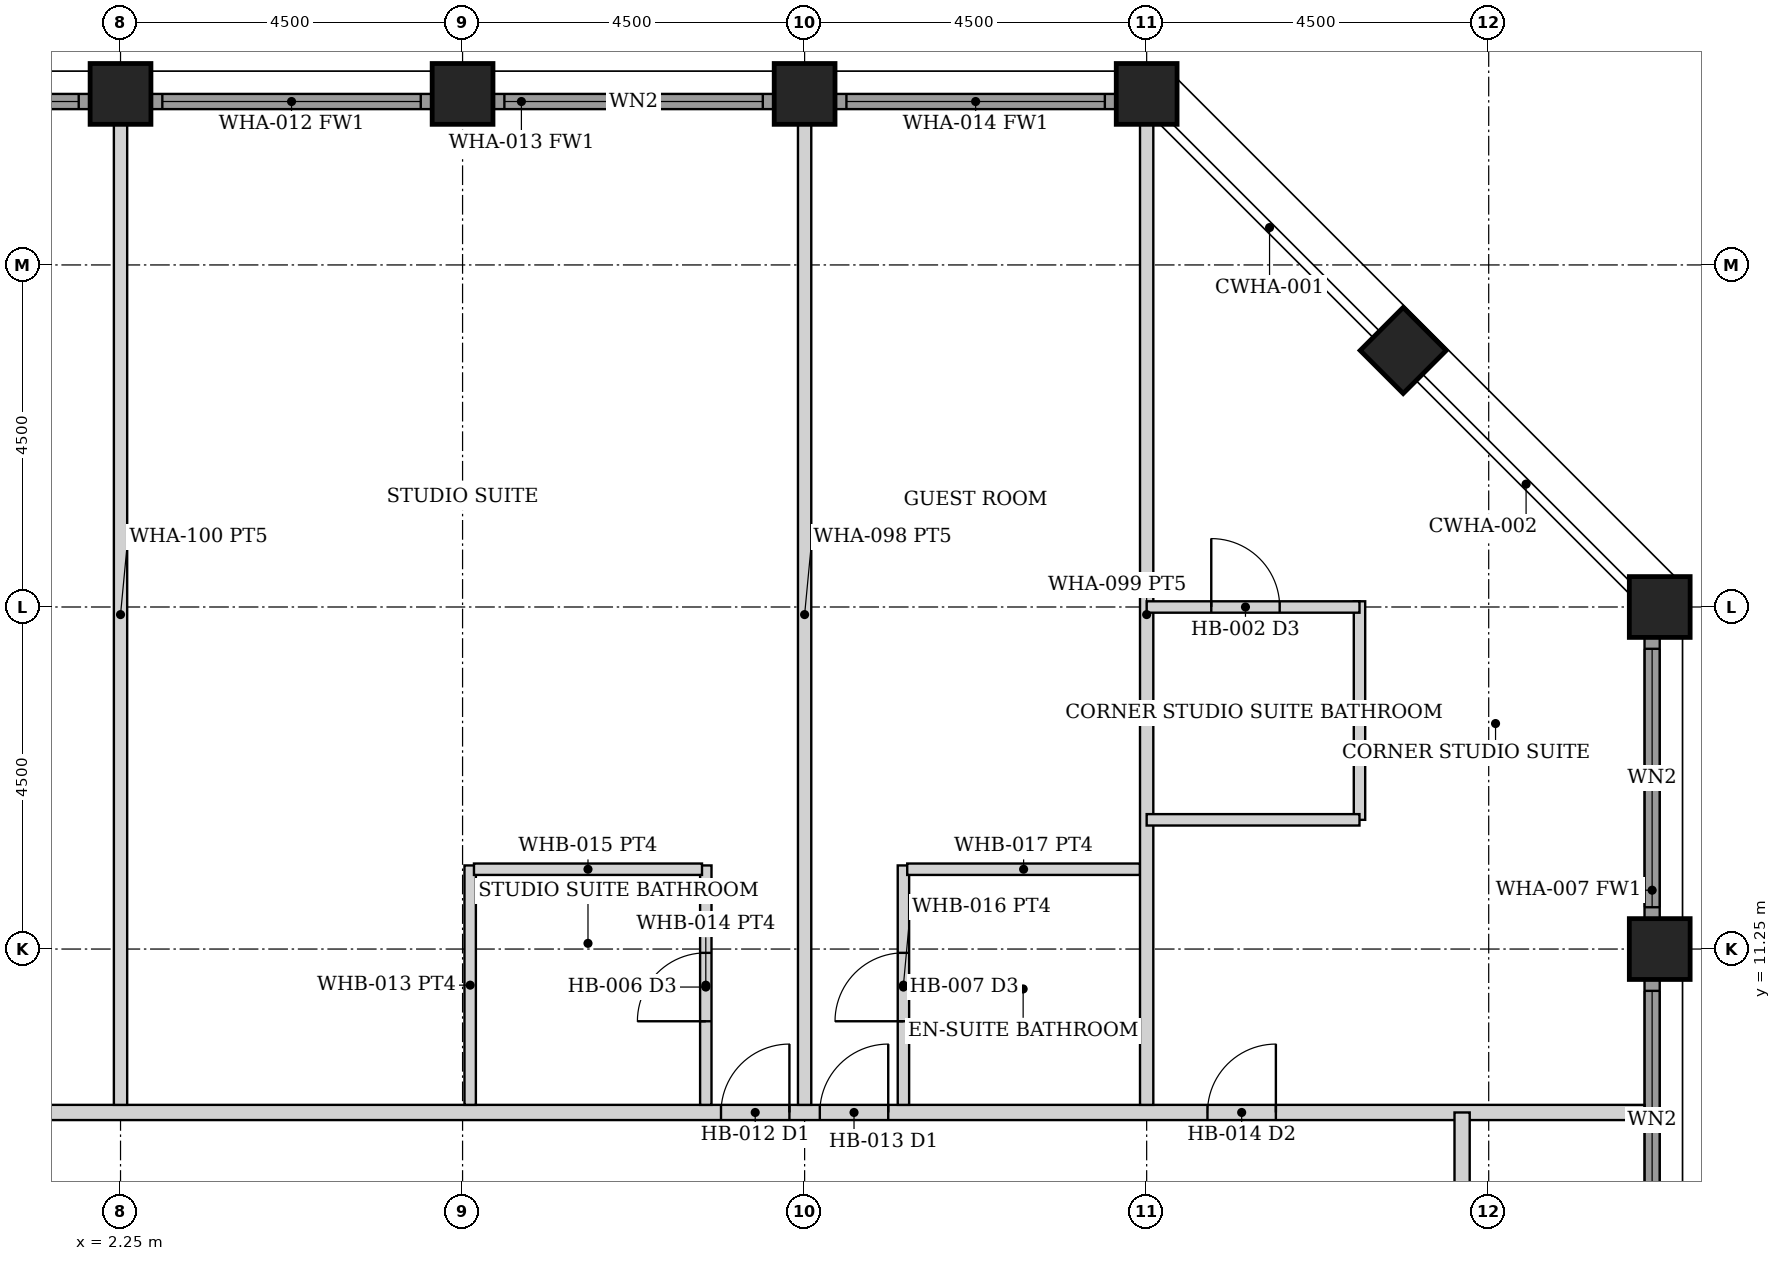
"""IFC4 building model, lengths in metres.
Left out: names, types, materials, properties, quantities, classifications, styles, units other than length and angle.
Written with IfcOpenShell. Run it as: python <this file> out.ifc"""

import sys

from ifc_helpers import new_model, si_unit, direction, frame, frame_2d, origin, origin_2d, place, context, subcontext, project, spatial, rectangle, hollow_rectangle, extrude, element, fill, save


model = new_model("IFC4")
c1 = context("Model", 3, precision=1e-05, world=origin(), true_north=direction((0.0, 1.0)))
c2 = subcontext(c1, "Body", "Model", "MODEL_VIEW")
j1 = project(units=[si_unit("LENGTHUNIT", "METRE"), si_unit("PLANEANGLEUNIT", "RADIAN")], contexts=[c1])
p1 = place(None, origin())
s1 = spatial("IfcSite", under=j1, at=p1, CompositionType="ELEMENT")
p2 = place(p1, origin())
s2 = spatial("IfcBuilding", under=s1, at=p2, CompositionType="ELEMENT")
p3 = place(p2, frame((0.0, 0.0, 129.2)))
s3 = spatial("IfcBuildingStorey", under=s2, at=p3, CompositionType="ELEMENT", Elevation=129.2)
for number, where, z_axis, x_axis in (
    (1, (2.25, 22.5, 0.0), (0.0, 0.0, 1.0), (0.0, 1.0, 0.0)),
    (2, (6.75, 22.5, 0.0), (0.0, 0.0, 1.0), (0.0, 1.0, 0.0)),
    (3, (11.25, 22.5, 0.0), (0.0, 0.0, 1.0), (0.0, 1.0, 0.0)),
    (4, (22.5, 11.25, 0.0), (0.0, 0.0, 1.0), (1.0, 0.0, 0.0)),
    (5, (15.75, 22.5, 0.0), (0.0, 0.0, 1.0), (0.0, 1.0, 0.0)),
    (6, (22.5, 15.75, 0.0), (0.0, 0.0, 1.0), (1.0, 0.0, 0.0)),
    (7, (19.125, 19.125, 0.0), (0.0, 0.0, 1.0), (0.707, 0.707, 0.0)),
):
    element("IfcColumn", number, at=place(p3, frame(where, z_axis=z_axis, x_axis=x_axis)), inside=s3, PredefinedType="COLUMN", context=c2, shape_type="SweptSolid", body=[
        extrude(hollow_rectangle(XDim=0.8, YDim=0.8, WallThickness=0.06, at=origin_2d()), origin(), (0.0, 0.0, 1.0), 3.6),
    ])
p4 = place(p3, frame((22.4, 7.155, 0.0), z_axis=(0.0, 0.0, 1.0), x_axis=(0.0, 1.0, 0.0)))
e8 = element("IfcWall", 8, at=p4, inside=s3, PredefinedType="SOLIDWALL", context=c2, shape_type="SweptSolid", body=[
    extrude(rectangle(XDim=3.69, YDim=0.2, at=frame_2d((1.845, 0.0))), origin(), (0.0, 0.0, 1.0), 2.479),
])
p5 = place(p4, frame((0.145, 0.0, 0.3)))
e9 = element("IfcOpeningElement", 9, at=p5, cuts=e8, PredefinedType="OPENING", context=c2, shape_type="SweptSolid", body=[
    extrude(rectangle(XDim=3.4, YDim=2.029, at=frame_2d((1.7, 1.015))), frame((0.0, 0.11, 0.0), z_axis=(0.0, -1.0, 0.0), x_axis=(1.0, 0.0, 0.0)), (0.0, 0.0, 1.0), 0.22),
])
p6 = place(p3, frame((22.4, 11.655, 0.0), z_axis=(0.0, 0.0, 1.0), x_axis=(0.0, 1.0, 0.0)))
e10 = element("IfcWall", 10, at=p6, inside=s3, PredefinedType="SOLIDWALL", context=c2, shape_type="SweptSolid", body=[
    extrude(rectangle(XDim=3.69, YDim=0.2, at=frame_2d((1.845, 0.0))), origin(), (0.0, 0.0, 1.0), 2.479),
])
p7 = place(p6, frame((0.145, 0.0, 0.3)))
e11 = element("IfcOpeningElement", 11, at=p7, cuts=e10, PredefinedType="OPENING", context=c2, shape_type="SweptSolid", body=[
    extrude(rectangle(XDim=3.4, YDim=2.029, at=frame_2d((1.7, 1.015))), frame((0.0, 0.11, 0.0), z_axis=(0.0, -1.0, 0.0), x_axis=(1.0, 0.0, 0.0)), (0.0, 0.0, 1.0), 0.22),
])
p8 = place(p3, frame((-1.845, 22.4, 0.0), z_axis=(0.0, 0.0, 1.0), x_axis=(1.0, 0.0, 0.0)))
e12 = element("IfcWall", 12, at=p8, inside=s3, PredefinedType="SOLIDWALL", context=c2, shape_type="SweptSolid", body=[
    extrude(rectangle(XDim=3.69, YDim=0.2, at=frame_2d((1.845, 0.0))), origin(), (0.0, 0.0, 1.0), 2.479),
])
p9 = place(p8, frame((0.145, 0.0, 0.3)))
e13 = element("IfcOpeningElement", 13, at=p9, cuts=e12, PredefinedType="OPENING", context=c2, shape_type="SweptSolid", body=[
    extrude(rectangle(XDim=3.4, YDim=2.029, at=frame_2d((1.7, 1.015))), frame((0.0, 0.11, 0.0), z_axis=(0.0, -1.0, 0.0), x_axis=(1.0, 0.0, 0.0)), (0.0, 0.0, 1.0), 0.22),
])
p10 = place(p3, frame((2.655, 22.4, 0.0), z_axis=(0.0, 0.0, 1.0), x_axis=(1.0, 0.0, 0.0)))
e14 = element("IfcWall", 14, at=p10, inside=s3, PredefinedType="SOLIDWALL", context=c2, shape_type="SweptSolid", body=[
    extrude(rectangle(XDim=3.69, YDim=0.2, at=frame_2d((1.845, 0.0))), origin(), (0.0, 0.0, 1.0), 2.479),
])
p11 = place(p10, frame((0.145, 0.0, 0.3)))
e15 = element("IfcOpeningElement", 15, at=p11, cuts=e14, PredefinedType="OPENING", context=c2, shape_type="SweptSolid", body=[
    extrude(rectangle(XDim=3.4, YDim=2.029, at=frame_2d((1.7, 1.015))), frame((0.0, 0.11, 0.0), z_axis=(0.0, -1.0, 0.0), x_axis=(1.0, 0.0, 0.0)), (0.0, 0.0, 1.0), 0.22),
])
p12 = place(p3, frame((7.155, 22.4, 0.0), z_axis=(0.0, 0.0, 1.0), x_axis=(1.0, 0.0, 0.0)))
e16 = element("IfcWall", 16, at=p12, inside=s3, PredefinedType="SOLIDWALL", context=c2, shape_type="SweptSolid", body=[
    extrude(rectangle(XDim=3.69, YDim=0.2, at=frame_2d((1.845, 0.0))), origin(), (0.0, 0.0, 1.0), 2.479),
])
p13 = place(p12, frame((0.145, 0.0, 0.3)))
e17 = element("IfcOpeningElement", 17, at=p13, cuts=e16, PredefinedType="OPENING", context=c2, shape_type="SweptSolid", body=[
    extrude(rectangle(XDim=3.4, YDim=2.029, at=frame_2d((1.7, 1.015))), frame((0.0, 0.11, 0.0), z_axis=(0.0, -1.0, 0.0), x_axis=(1.0, 0.0, 0.0)), (0.0, 0.0, 1.0), 0.22),
])
p14 = place(p3, frame((11.655, 22.4, 0.0), z_axis=(0.0, 0.0, 1.0), x_axis=(1.0, 0.0, 0.0)))
e18 = element("IfcWall", 18, at=p14, inside=s3, PredefinedType="SOLIDWALL", context=c2, shape_type="SweptSolid", body=[
    extrude(rectangle(XDim=3.69, YDim=0.2, at=frame_2d((1.845, 0.0))), origin(), (0.0, 0.0, 1.0), 2.479),
])
p15 = place(p14, frame((0.145, 0.0, 0.3)))
e19 = element("IfcOpeningElement", 19, at=p15, cuts=e18, PredefinedType="OPENING", context=c2, shape_type="SweptSolid", body=[
    extrude(rectangle(XDim=3.4, YDim=2.029, at=frame_2d((1.7, 1.015))), frame((0.0, 0.11, 0.0), z_axis=(0.0, -1.0, 0.0), x_axis=(1.0, 0.0, 0.0)), (0.0, 0.0, 1.0), 0.22),
])
p16 = place(p3, frame((-22.3, 9.1, 0.0), z_axis=(0.0, 0.0, 1.0), x_axis=(1.0, 0.0, 0.0)))
e20 = element("IfcWall", 20, at=p16, inside=s3, PredefinedType="PARTITIONING", context=c2, shape_type="SweptSolid", body=[
    extrude(rectangle(XDim=44.6, YDim=0.2, at=frame_2d((22.3, 0.0))), origin(), (0.0, 0.0, 1.0), 2.473),
])
p17 = place(p16, frame((6.75, 0.0, 0.0)))
e21 = element("IfcOpeningElement", 21, at=p17, cuts=e20, PredefinedType="OPENING", context=c2, shape_type="SweptSolid", body=[
    extrude(rectangle(XDim=0.9, YDim=2.1, at=frame_2d((0.45, 1.05))), frame((0.0, 0.11, 0.0), z_axis=(0.0, -1.0, 0.0), x_axis=(1.0, 0.0, 0.0)), (0.0, 0.0, 1.0), 0.22),
])
p18 = place(p16, frame((14.45, 0.0, 0.0)))
e22 = element("IfcOpeningElement", 22, at=p18, cuts=e20, PredefinedType="OPENING", context=c2, shape_type="SweptSolid", body=[
    extrude(rectangle(XDim=0.9, YDim=2.1, at=frame_2d((0.45, 1.05))), frame((0.0, 0.11, 0.0), z_axis=(0.0, -1.0, 0.0), x_axis=(1.0, 0.0, 0.0)), (0.0, 0.0, 1.0), 0.22),
])
p19 = place(p16, frame((15.75, 0.0, 0.0)))
e23 = element("IfcOpeningElement", 23, at=p19, cuts=e20, PredefinedType="OPENING", context=c2, shape_type="SweptSolid", body=[
    extrude(rectangle(XDim=0.9, YDim=2.1, at=frame_2d((0.45, 1.05))), frame((0.0, 0.11, 0.0), z_axis=(0.0, -1.0, 0.0), x_axis=(1.0, 0.0, 0.0)), (0.0, 0.0, 1.0), 0.22),
])
p20 = place(p16, frame((32.45, 0.0, 0.0)))
e24 = element("IfcOpeningElement", 24, at=p20, cuts=e20, PredefinedType="OPENING", context=c2, shape_type="SweptSolid", body=[
    extrude(rectangle(XDim=0.9, YDim=2.1, at=frame_2d((0.45, 1.05))), frame((0.0, 0.11, 0.0), z_axis=(0.0, -1.0, 0.0), x_axis=(1.0, 0.0, 0.0)), (0.0, 0.0, 1.0), 0.22),
])
p21 = place(p16, frame((33.75, 0.0, 0.0)))
e25 = element("IfcOpeningElement", 25, at=p21, cuts=e20, PredefinedType="OPENING", context=c2, shape_type="SweptSolid", body=[
    extrude(rectangle(XDim=0.9, YDim=2.1, at=frame_2d((0.45, 1.05))), frame((0.0, 0.11, 0.0), z_axis=(0.0, -1.0, 0.0), x_axis=(1.0, 0.0, 0.0)), (0.0, 0.0, 1.0), 0.22),
])
p22 = place(p16, frame((38.85, 0.0, 0.0)))
e26 = element("IfcOpeningElement", 26, at=p22, cuts=e20, PredefinedType="OPENING", context=c2, shape_type="SweptSolid", body=[
    extrude(rectangle(XDim=0.9, YDim=2.1, at=frame_2d((0.45, 1.05))), frame((0.0, 0.11, 0.0), z_axis=(0.0, -1.0, 0.0), x_axis=(1.0, 0.0, 0.0)), (0.0, 0.0, 1.0), 0.22),
])
p23 = place(p16, frame((4.85, 0.0, 0.0)))
e27 = element("IfcOpeningElement", 27, at=p23, cuts=e20, PredefinedType="OPENING", context=c2, shape_type="SweptSolid", body=[
    extrude(rectangle(XDim=0.9, YDim=2.1, at=frame_2d((0.45, 1.05))), frame((0.0, 0.11, 0.0), z_axis=(0.0, -1.0, 0.0), x_axis=(1.0, 0.0, 0.0)), (0.0, 0.0, 1.0), 0.22),
])
p24 = place(p3, frame((19.9, -9.1, 0.0), z_axis=(0.0, 0.0, 1.0), x_axis=(0.0, 1.0, 0.0)))
e28 = element("IfcWall", 28, at=p24, inside=s3, PredefinedType="PARTITIONING", context=c2, shape_type="SweptSolid", body=[
    extrude(rectangle(XDim=18.2, YDim=0.2, at=frame_2d((9.1, 0.0))), origin(), (0.0, 0.0, 1.0), 2.473),
])
p25 = place(p24, frame((8.6, 0.0, 0.0)))
e29 = element("IfcOpeningElement", 29, at=p25, cuts=e28, PredefinedType="OPENING", context=c2, shape_type="SweptSolid", body=[
    extrude(rectangle(XDim=1.0, YDim=2.1, at=frame_2d((0.5, 1.05))), frame((0.0, 0.11, 0.0), z_axis=(0.0, -1.0, 0.0), x_axis=(1.0, 0.0, 0.0)), (0.0, 0.0, 1.0), 0.22),
])
p26 = place(p3, frame((9.95, 9.2, 0.0), z_axis=(0.0, 0.0, 1.0), x_axis=(0.0, 1.0, 0.0)))
e30 = element("IfcWall", 30, at=p26, inside=s3, PredefinedType="PARTITIONING", context=c2, shape_type="SweptSolid", body=[
    extrude(rectangle(XDim=3.15, YDim=0.15, at=frame_2d((1.575, 0.0))), origin(), (0.0, 0.0, 1.0), 2.473),
])
p27 = place(p26, frame((1.1, 0.0, 0.0)))
e31 = element("IfcOpeningElement", 31, at=p27, cuts=e30, PredefinedType="OPENING", context=c2, shape_type="SweptSolid", body=[
    extrude(rectangle(XDim=0.9, YDim=2.1, at=frame_2d((0.45, 1.05))), frame((0.0, 0.085, 0.0), z_axis=(0.0, -1.0, 0.0), x_axis=(1.0, 0.0, 0.0)), (0.0, 0.0, 1.0), 0.17),
])
p28 = place(p3, frame((6.85, 9.2, 0.0), z_axis=(0.0, 0.0, 1.0), x_axis=(0.0, 1.0, 0.0)))
e32 = element("IfcWall", 32, at=p28, inside=s3, PredefinedType="PARTITIONING", context=c2, shape_type="SweptSolid", body=[
    extrude(rectangle(XDim=3.15, YDim=0.15, at=frame_2d((1.575, 0.0))), origin(), (0.0, 0.0, 1.0), 2.473),
])
p29 = place(p3, frame((6.9, 12.3, 0.0), z_axis=(0.0, 0.0, 1.0), x_axis=(1.0, 0.0, 0.0)))
e33 = element("IfcWall", 33, at=p29, inside=s3, PredefinedType="PARTITIONING", context=c2, shape_type="SweptSolid", body=[
    extrude(rectangle(XDim=3.0, YDim=0.15, at=frame_2d((1.5, 0.0))), origin(), (0.0, 0.0, 1.0), 2.473),
])
p30 = place(p3, frame((12.55, 9.2, 0.0), z_axis=(0.0, 0.0, 1.0), x_axis=(0.0, 1.0, 0.0)))
e34 = element("IfcWall", 34, at=p30, inside=s3, PredefinedType="PARTITIONING", context=c2, shape_type="SweptSolid", body=[
    extrude(rectangle(XDim=3.15, YDim=0.15, at=frame_2d((1.575, 0.0))), origin(), (0.0, 0.0, 1.0), 2.473),
])
p31 = place(p30, frame((1.1, 0.0, 0.0)))
e35 = element("IfcOpeningElement", 35, at=p31, cuts=e34, PredefinedType="OPENING", context=c2, shape_type="SweptSolid", body=[
    extrude(rectangle(XDim=0.9, YDim=2.1, at=frame_2d((0.45, 1.05))), frame((0.0, 0.085, 0.0), z_axis=(0.0, -1.0, 0.0), x_axis=(1.0, 0.0, 0.0)), (0.0, 0.0, 1.0), 0.17),
])
p32 = place(p3, frame((12.6, 12.3, 0.0), z_axis=(0.0, 0.0, 1.0), x_axis=(1.0, 0.0, 0.0)))
e36 = element("IfcWall", 36, at=p32, inside=s3, PredefinedType="PARTITIONING", context=c2, shape_type="SweptSolid", body=[
    extrude(rectangle(XDim=3.062, YDim=0.15, at=frame_2d((1.531, 0.0))), origin(), (0.0, 0.0, 1.0), 2.473),
])
for number, where, z_axis, x_axis in (
    (37, (2.25, 9.2, 0.0), (0.0, 0.0, 1.0), (0.0, 1.0, 0.0)),
    (38, (11.25, 9.2, 0.0), (0.0, 0.0, 1.0), (0.0, 1.0, 0.0)),
    (39, (15.75, 9.2, 0.0), (0.0, 0.0, 1.0), (0.0, 1.0, 0.0)),
):
    element("IfcWall", number, at=place(p3, frame(where, z_axis=z_axis, x_axis=x_axis)), inside=s3, PredefinedType="PARTITIONING", context=c2, shape_type="SweptSolid", body=[
        extrude(rectangle(XDim=12.9, YDim=0.175, at=frame_2d((6.45, 0.0))), origin(), (0.0, 0.0, 1.0), 2.473),
    ])
p33 = place(p3, frame((18.55, 12.95, 0.0), z_axis=(0.0, 0.0, 1.0), x_axis=(0.0, 1.0, 0.0)))
e40 = element("IfcWall", 40, at=p33, inside=s3, PredefinedType="PARTITIONING", context=c2, shape_type="SweptSolid", body=[
    extrude(rectangle(XDim=2.875, YDim=0.15, at=frame_2d((1.438, 0.0))), origin(), (0.0, 0.0, 1.0), 2.473),
])
p34 = place(p3, frame((15.75, 12.95, 0.0), z_axis=(0.0, 0.0, 1.0), x_axis=(1.0, 0.0, 0.0)))
e41 = element("IfcWall", 41, at=p34, inside=s3, PredefinedType="PARTITIONING", context=c2, shape_type="SweptSolid", body=[
    extrude(rectangle(XDim=2.8, YDim=0.15, at=frame_2d((1.4, 0.0))), origin(), (0.0, 0.0, 1.0), 2.473),
])
p35 = place(p3, frame((15.75, 15.75, 0.0), z_axis=(0.0, 0.0, 1.0), x_axis=(1.0, 0.0, 0.0)))
e42 = element("IfcWall", 42, at=p35, inside=s3, PredefinedType="PARTITIONING", context=c2, shape_type="SweptSolid", body=[
    extrude(rectangle(XDim=2.8, YDim=0.15, at=frame_2d((1.4, 0.0))), origin(), (0.0, 0.0, 1.0), 2.473),
])
p36 = place(p35, frame((0.85, 0.0, 0.0)))
e43 = element("IfcOpeningElement", 43, at=p36, cuts=e42, PredefinedType="OPENING", context=c2, shape_type="SweptSolid", body=[
    extrude(rectangle(XDim=0.9, YDim=2.1, at=frame_2d((0.45, 1.05))), frame((0.0, 0.085, 0.0), z_axis=(0.0, -1.0, 0.0), x_axis=(1.0, 0.0, 0.0)), (0.0, 0.0, 1.0), 0.17),
])
p37 = place(p5, origin())
e44 = element("IfcWindow", 44, at=p37, inside=s3, PartitioningType="SINGLE_PANEL", PredefinedType="WINDOW", context=c2, shape_type="SweptSolid", body=[
    extrude(rectangle(XDim=3.4, YDim=2.029, at=frame_2d((1.7, 1.015))), frame((0.0, 0.03, 0.0), z_axis=(0.0, -1.0, 0.0), x_axis=(1.0, 0.0, 0.0)), (0.0, 0.0, 1.0), 0.06),
])
fill(e9, e44)
p38 = place(p7, origin())
e45 = element("IfcWindow", 45, at=p38, inside=s3, PartitioningType="SINGLE_PANEL", PredefinedType="WINDOW", context=c2, shape_type="SweptSolid", body=[
    extrude(rectangle(XDim=3.4, YDim=2.029, at=frame_2d((1.7, 1.015))), frame((0.0, 0.03, 0.0), z_axis=(0.0, -1.0, 0.0), x_axis=(1.0, 0.0, 0.0)), (0.0, 0.0, 1.0), 0.06),
])
fill(e11, e45)
p39 = place(p9, origin())
e46 = element("IfcWindow", 46, at=p39, inside=s3, PartitioningType="SINGLE_PANEL", PredefinedType="WINDOW", context=c2, shape_type="SweptSolid", body=[
    extrude(rectangle(XDim=3.4, YDim=2.029, at=frame_2d((1.7, 1.015))), frame((0.0, 0.03, 0.0), z_axis=(0.0, -1.0, 0.0), x_axis=(1.0, 0.0, 0.0)), (0.0, 0.0, 1.0), 0.06),
])
fill(e13, e46)
p40 = place(p11, origin())
e47 = element("IfcWindow", 47, at=p40, inside=s3, PartitioningType="SINGLE_PANEL", PredefinedType="WINDOW", context=c2, shape_type="SweptSolid", body=[
    extrude(rectangle(XDim=3.4, YDim=2.029, at=frame_2d((1.7, 1.015))), frame((0.0, 0.03, 0.0), z_axis=(0.0, -1.0, 0.0), x_axis=(1.0, 0.0, 0.0)), (0.0, 0.0, 1.0), 0.06),
])
fill(e15, e47)
p41 = place(p13, origin())
e48 = element("IfcWindow", 48, at=p41, inside=s3, PartitioningType="SINGLE_PANEL", PredefinedType="WINDOW", context=c2, shape_type="SweptSolid", body=[
    extrude(rectangle(XDim=3.4, YDim=2.029, at=frame_2d((1.7, 1.015))), frame((0.0, 0.03, 0.0), z_axis=(0.0, -1.0, 0.0), x_axis=(1.0, 0.0, 0.0)), (0.0, 0.0, 1.0), 0.06),
])
fill(e17, e48)
p42 = place(p15, origin())
e49 = element("IfcWindow", 49, at=p42, inside=s3, PartitioningType="SINGLE_PANEL", PredefinedType="WINDOW", context=c2, shape_type="SweptSolid", body=[
    extrude(rectangle(XDim=3.4, YDim=2.029, at=frame_2d((1.7, 1.015))), frame((0.0, 0.03, 0.0), z_axis=(0.0, -1.0, 0.0), x_axis=(1.0, 0.0, 0.0)), (0.0, 0.0, 1.0), 0.06),
])
fill(e19, e49)
p43 = place(p20, origin())
e50 = element("IfcDoor", 50, at=p43, inside=s3, OperationType="SINGLE_SWING_RIGHT", PredefinedType="DOOR", context=c2, shape_type="SweptSolid", body=[
    extrude(rectangle(XDim=0.9, YDim=2.1, at=frame_2d((0.45, 1.05))), frame((0.0, 0.025, 0.0), z_axis=(0.0, -1.0, 0.0), x_axis=(1.0, 0.0, 0.0)), (0.0, 0.0, 1.0), 0.05),
])
fill(e24, e50)
p44 = place(p27, origin())
e51 = element("IfcDoor", 51, at=p44, inside=s3, OperationType="SINGLE_SWING_LEFT", PredefinedType="DOOR", context=c2, shape_type="SweptSolid", body=[
    extrude(rectangle(XDim=0.9, YDim=2.1, at=frame_2d((0.45, 1.05))), frame((0.0, 0.025, 0.0), z_axis=(0.0, -1.0, 0.0), x_axis=(1.0, 0.0, 0.0)), (0.0, 0.0, 1.0), 0.05),
])
fill(e31, e51)
p45 = place(p21, origin())
e52 = element("IfcDoor", 52, at=p45, inside=s3, OperationType="SINGLE_SWING_RIGHT", PredefinedType="DOOR", context=c2, shape_type="SweptSolid", body=[
    extrude(rectangle(XDim=0.9, YDim=2.1, at=frame_2d((0.45, 1.05))), frame((0.0, 0.025, 0.0), z_axis=(0.0, -1.0, 0.0), x_axis=(1.0, 0.0, 0.0)), (0.0, 0.0, 1.0), 0.05),
])
fill(e25, e52)
p46 = place(p31, origin())
e53 = element("IfcDoor", 53, at=p46, inside=s3, OperationType="SINGLE_SWING_LEFT", PredefinedType="DOOR", context=c2, shape_type="SweptSolid", body=[
    extrude(rectangle(XDim=0.9, YDim=2.1, at=frame_2d((0.45, 1.05))), frame((0.0, 0.025, 0.0), z_axis=(0.0, -1.0, 0.0), x_axis=(1.0, 0.0, 0.0)), (0.0, 0.0, 1.0), 0.05),
])
fill(e35, e53)
p47 = place(p22, origin())
e54 = element("IfcDoor", 54, at=p47, inside=s3, OperationType="SINGLE_SWING_RIGHT", PredefinedType="DOOR", context=c2, shape_type="SweptSolid", body=[
    extrude(rectangle(XDim=0.9, YDim=2.1, at=frame_2d((0.45, 1.05))), frame((0.0, 0.025, 0.0), z_axis=(0.0, -1.0, 0.0), x_axis=(1.0, 0.0, 0.0)), (0.0, 0.0, 1.0), 0.05),
])
fill(e26, e54)
p48 = place(p36, origin())
e55 = element("IfcDoor", 55, at=p48, inside=s3, OperationType="SINGLE_SWING_LEFT", PredefinedType="DOOR", context=c2, shape_type="SweptSolid", body=[
    extrude(rectangle(XDim=0.9, YDim=2.1, at=frame_2d((0.45, 1.05))), frame((0.0, 0.025, 0.0), z_axis=(0.0, -1.0, 0.0), x_axis=(1.0, 0.0, 0.0)), (0.0, 0.0, 1.0), 0.05),
])
fill(e43, e55)
save(model, sys.argv[1])
